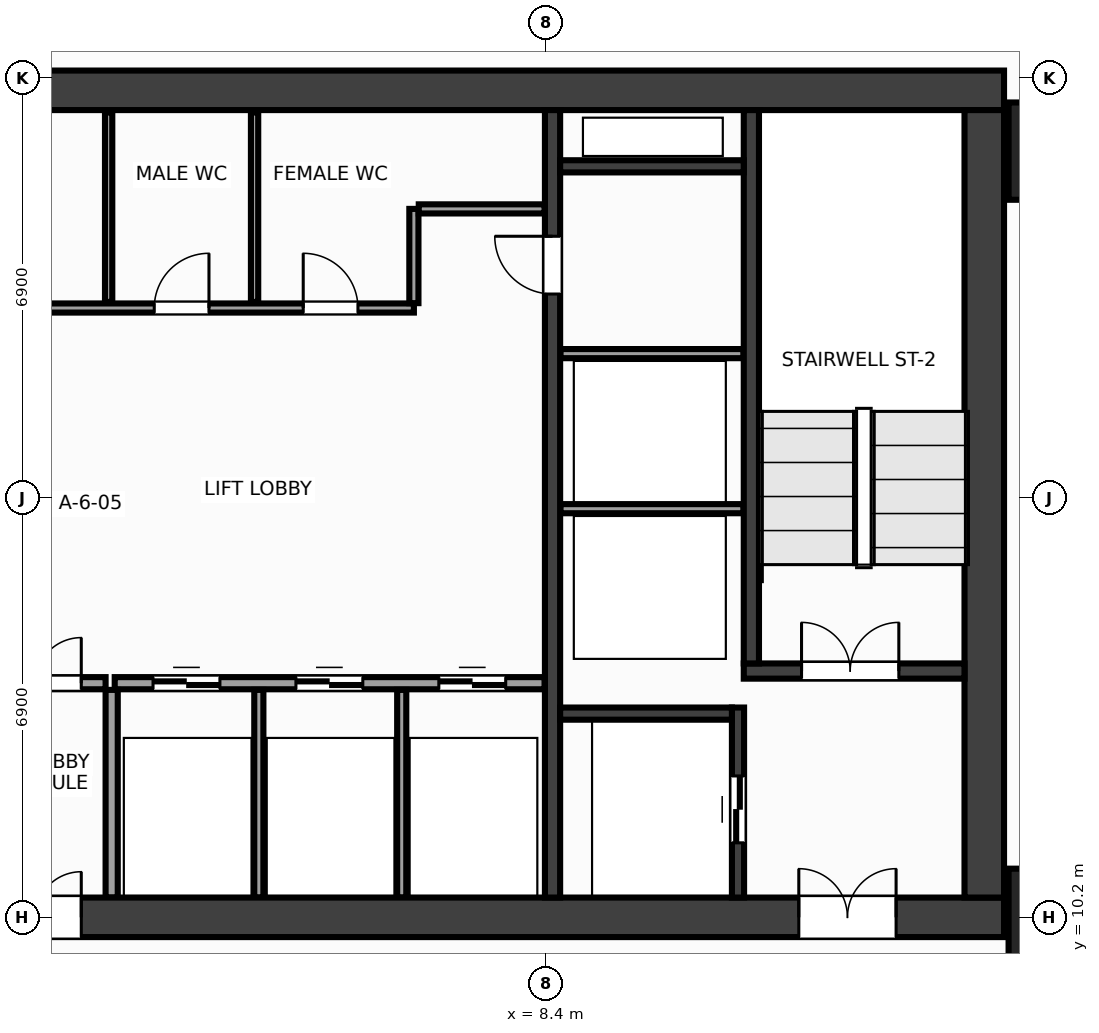
"""IFC4 building model, lengths in metres.
Left out: names, types, materials, properties, quantities, classifications, styles, units other than length and angle.
Written with IfcOpenShell. Run it as: python <this file> out.ifc"""

import sys

from ifc_helpers import new_model, si_unit, direction, frame, frame_2d, origin, origin_2d, place, context, subcontext, project, spatial, rectangle, extrude, source, transform, mapped, element, fill, save


model = new_model("IFC4")
c1 = context("Model", 3, precision=1e-05, world=origin(), true_north=direction((0.0, 1.0)))
c2 = subcontext(c1, "Body", "Model", "MODEL_VIEW")
j1 = project(units=[si_unit("LENGTHUNIT", "METRE"), si_unit("PLANEANGLEUNIT", "RADIAN")], contexts=[c1])
p1 = place(None, origin())
s1 = spatial("IfcSite", under=j1, at=p1, CompositionType="ELEMENT")
p2 = place(p1, origin())
s2 = spatial("IfcBuilding", under=s1, at=p2, CompositionType="ELEMENT")
p3 = place(p2, frame((0.0, 0.0, 171.2)))
s3 = spatial("IfcBuildingStorey", under=s2, at=p3, CompositionType="ELEMENT", Elevation=171.2)
m1 = source(origin(), c2, "Body", "SweptSolid", [
    extrude(rectangle(XDim=31.85, YDim=0.65, at=frame_2d((15.925, 0.0))), origin(), (0.0, 0.0, 1.0), 3.6),
])
p4 = place(p3, frame((-15.925, 23.8, 0.0), z_axis=(0.0, 0.0, 1.0), x_axis=(1.0, 0.0, 0.0)))
e1 = element("IfcWall", 1, at=p4, inside=s3, PredefinedType="SHEAR", context=c2, shape_type="MappedRepresentation", body=[
    mapped(m1, transform((0.0, 0.0, 0.0), x_axis=(1.0, 0.0, 0.0), y_axis=(0.0, 1.0, 0.0), z_axis=(0.0, 0.0, 1.0), scale=1.0)),
])
p5 = place(p3, frame((-15.925, 10.2, 0.0), z_axis=(0.0, 0.0, 1.0), x_axis=(1.0, 0.0, 0.0)))
e2 = element("IfcWall", 2, at=p5, inside=s3, PredefinedType="SHEAR", context=c2, shape_type="MappedRepresentation", body=[
    mapped(m1, transform((0.0, 0.0, 0.0), x_axis=(1.0, 0.0, 0.0), y_axis=(0.0, 1.0, 0.0), z_axis=(0.0, 0.0, 1.0), scale=1.0)),
])
p6 = place(p5, frame((1.775, 0.0, 0.0)))
e3 = element("IfcOpeningElement", 3, at=p6, cuts=e2, PredefinedType="OPENING", context=c2, shape_type="SweptSolid", body=[
    extrude(rectangle(XDim=1.6, YDim=2.15, at=frame_2d((0.8, 1.075))), frame((0.0, 0.337, 0.0), z_axis=(0.0, -1.0, 0.0), x_axis=(1.0, 0.0, 0.0)), (0.0, 0.0, 1.0), 0.674),
])
p7 = place(p5, frame((28.475, 0.0, 0.0)))
e4 = element("IfcOpeningElement", 4, at=p7, cuts=e2, PredefinedType="OPENING", context=c2, shape_type="SweptSolid", body=[
    extrude(rectangle(XDim=1.6, YDim=2.15, at=frame_2d((0.8, 1.075))), frame((0.0, 0.337, 0.0), z_axis=(0.0, -1.0, 0.0), x_axis=(1.0, 0.0, 0.0)), (0.0, 0.0, 1.0), 0.674),
])
p8 = place(p5, frame((15.175, 0.0, 0.0)))
e5 = element("IfcOpeningElement", 5, at=p8, cuts=e2, PredefinedType="OPENING", context=c2, shape_type="SweptSolid", body=[
    extrude(rectangle(XDim=1.5, YDim=2.2, at=frame_2d((0.75, 1.1))), frame((0.0, 0.337, 0.0), z_axis=(0.0, -1.0, 0.0), x_axis=(1.0, 0.0, 0.0)), (0.0, 0.0, 1.0), 0.674),
])
m2 = source(origin(), c2, "Body", "SweptSolid", [
    extrude(rectangle(XDim=12.95, YDim=0.65, at=frame_2d((6.475, 0.0))), origin(), (0.0, 0.0, 1.0), 3.6),
])
p9 = place(p3, frame((15.6, 10.525, 0.0), z_axis=(0.0, 0.0, 1.0), x_axis=(0.0, 1.0, 0.0)))
e6 = element("IfcWall", 6, at=p9, inside=s3, PredefinedType="SHEAR", context=c2, shape_type="MappedRepresentation", body=[
    mapped(m2, transform((0.0, 0.0, 0.0), x_axis=(1.0, 0.0, 0.0), y_axis=(0.0, 1.0, 0.0), z_axis=(0.0, 0.0, 1.0), scale=1.0)),
])
m3 = source(origin(), c2, "Body", "SweptSolid", [
    extrude(rectangle(XDim=12.95, YDim=0.25, at=frame_2d((6.475, 0.0))), origin(), (0.0, 0.0, 1.0), 3.6),
])
p10 = place(p3, frame((8.5, 10.525, 0.0), z_axis=(0.0, 0.0, 1.0), x_axis=(0.0, 1.0, 0.0)))
e7 = element("IfcWall", 7, at=p10, inside=s3, PredefinedType="SHEAR", context=c2, shape_type="MappedRepresentation", body=[
    mapped(m3, transform((0.0, 0.0, 0.0), x_axis=(1.0, 0.0, 0.0), y_axis=(0.0, 1.0, 0.0), z_axis=(0.0, 0.0, 1.0), scale=1.0)),
])
p11 = place(p10, frame((9.925, 0.0, 0.0)))
e8 = element("IfcOpeningElement", 8, at=p11, cuts=e7, PredefinedType="OPENING", context=c2, shape_type="SweptSolid", body=[
    extrude(rectangle(XDim=0.95, YDim=2.15, at=frame_2d((0.475, 1.075))), frame((0.0, 0.137, 0.0), z_axis=(0.0, -1.0, 0.0), x_axis=(1.0, 0.0, 0.0)), (0.0, 0.0, 1.0), 0.274),
])
m4 = source(origin(), c2, "Body", "SweptSolid", [
    extrude(rectangle(XDim=3.63, YDim=0.25, at=frame_2d((1.815, 0.0))), origin(), (0.0, 0.0, 1.0), 3.6),
])
p12 = place(p3, frame((11.645, 14.25, 0.0), z_axis=(0.0, 0.0, 1.0), x_axis=(1.0, 0.0, 0.0)))
e9 = element("IfcWall", 9, at=p12, inside=s3, PredefinedType="SHEAR", context=c2, shape_type="MappedRepresentation", body=[
    mapped(m4, transform((0.0, 0.0, 0.0), x_axis=(1.0, 0.0, 0.0), y_axis=(0.0, 1.0, 0.0), z_axis=(0.0, 0.0, 1.0), scale=1.0)),
])
p13 = place(p12, frame((0.95, 0.0, 0.0)))
e10 = element("IfcOpeningElement", 10, at=p13, cuts=e9, PredefinedType="OPENING", context=c2, shape_type="SweptSolid", body=[
    extrude(rectangle(XDim=1.6, YDim=2.15, at=frame_2d((0.8, 1.075))), frame((0.0, 0.137, 0.0), z_axis=(0.0, -1.0, 0.0), x_axis=(1.0, 0.0, 0.0)), (0.0, 0.0, 1.0), 0.274),
])
m5 = source(origin(), c2, "Body", "SweptSolid", [
    extrude(rectangle(XDim=9.1, YDim=0.25, at=frame_2d((4.55, 0.0))), origin(), (0.0, 0.0, 1.0), 3.6),
])
p14 = place(p3, frame((11.77, 14.375, 0.0), z_axis=(0.0, 0.0, 1.0), x_axis=(0.0, 1.0, 0.0)))
e11 = element("IfcWall", 11, at=p14, inside=s3, PredefinedType="SHEAR", context=c2, shape_type="MappedRepresentation", body=[
    mapped(m5, transform((0.0, 0.0, 0.0), x_axis=(1.0, 0.0, 0.0), y_axis=(0.0, 1.0, 0.0), z_axis=(0.0, 0.0, 1.0), scale=1.0)),
])
m6 = source(origin(), c2, "Body", "SweptSolid", [
    extrude(rectangle(XDim=3.125, YDim=0.2, at=frame_2d((1.562, 0.0))), origin(), (0.0, 0.0, 1.0), 3.6),
])
p15 = place(p3, frame((11.55, 10.525, 0.0), z_axis=(0.0, 0.0, 1.0), x_axis=(0.0, 1.0, 0.0)))
e12 = element("IfcWall", 12, at=p15, inside=s3, PredefinedType="SHEAR", context=c2, shape_type="MappedRepresentation", body=[
    mapped(m6, transform((0.0, 0.0, 0.0), x_axis=(1.0, 0.0, 0.0), y_axis=(0.0, 1.0, 0.0), z_axis=(0.0, 0.0, 1.0), scale=1.0)),
])
p16 = place(p15, frame((0.9, 0.0, 0.0)))
e13 = element("IfcOpeningElement", 13, at=p16, cuts=e12, PredefinedType="OPENING", context=c2, shape_type="SweptSolid", body=[
    extrude(rectangle(XDim=1.1, YDim=2.15, at=frame_2d((0.55, 1.075))), frame((0.0, 0.112, 0.0), z_axis=(0.0, -1.0, 0.0), x_axis=(1.0, 0.0, 0.0)), (0.0, 0.0, 1.0), 0.224),
])
m7 = source(origin(), c2, "Body", "SweptSolid", [
    extrude(rectangle(XDim=2.825, YDim=0.2, at=frame_2d((1.413, 0.0))), origin(), (0.0, 0.0, 1.0), 3.6),
])
p17 = place(p3, frame((8.625, 13.55, 0.0), z_axis=(0.0, 0.0, 1.0), x_axis=(1.0, 0.0, 0.0)))
e14 = element("IfcWall", 14, at=p17, inside=s3, PredefinedType="SHEAR", context=c2, shape_type="MappedRepresentation", body=[
    mapped(m7, transform((0.0, 0.0, 0.0), x_axis=(1.0, 0.0, 0.0), y_axis=(0.0, 1.0, 0.0), z_axis=(0.0, 0.0, 1.0), scale=1.0)),
])
m8 = source(origin(), c2, "Body", "SweptSolid", [
    extrude(rectangle(XDim=3.02, YDim=0.2, at=frame_2d((1.51, 0.0))), origin(), (0.0, 0.0, 1.0), 3.6),
])
p18 = place(p3, frame((8.625, 22.55, 0.0), z_axis=(0.0, 0.0, 1.0), x_axis=(1.0, 0.0, 0.0)))
e15 = element("IfcWall", 15, at=p18, inside=s3, PredefinedType="SHEAR", context=c2, shape_type="MappedRepresentation", body=[
    mapped(m8, transform((0.0, 0.0, 0.0), x_axis=(1.0, 0.0, 0.0), y_axis=(0.0, 1.0, 0.0), z_axis=(0.0, 0.0, 1.0), scale=1.0)),
])
m9 = source(origin(), c2, "Body", "SweptSolid", [
    extrude(rectangle(XDim=1.6, YDim=1.6, at=origin_2d()), origin(), (0.0, 0.0, 1.0), 3.6),
])
for number, where, z_axis, x_axis in (
    (16, (16.8, 10.2, 0.0), (0.0, 0.0, 1.0), (1.0, 0.0, 0.0)),
    (17, (16.8, 22.8, 0.0), (0.0, 0.0, 1.0), (1.0, 0.0, 0.0)),
):
    element("IfcColumn", number, at=place(p3, frame(where, z_axis=z_axis, x_axis=x_axis)), inside=s3, PredefinedType="COLUMN", context=c2, shape_type="MappedRepresentation", body=[
        mapped(m9, transform((0.0, 0.0, 0.0), x_axis=(1.0, 0.0, 0.0), y_axis=(0.0, 1.0, 0.0), z_axis=(0.0, 0.0, 1.0), scale=1.0)),
    ])
m10 = source(origin(), c2, "Body", "SweptSolid", [
    extrude(rectangle(XDim=3.01, YDim=0.15, at=frame_2d((1.505, 0.0))), origin(), (0.0, 0.0, 1.0), 3.38),
])
for number, where, z_axis, x_axis in (
    (18, (8.63, 16.92, 0.0), (0.0, 0.0, 1.0), (1.0, 0.0, 0.0)),
    (19, (8.63, 19.47, 0.0), (0.0, 0.0, 1.0), (1.0, 0.0, 0.0)),
):
    element("IfcWall", number, at=place(p3, frame(where, z_axis=z_axis, x_axis=x_axis)), inside=s3, PredefinedType="PARTITIONING", context=c2, shape_type="MappedRepresentation", body=[
        mapped(m10, transform((0.0, 0.0, 0.0), x_axis=(1.0, 0.0, 0.0), y_axis=(0.0, 1.0, 0.0), z_axis=(0.0, 0.0, 1.0), scale=1.0)),
    ])
m11 = source(origin(), c2, "Body", "SweptSolid", [
    extrude(rectangle(XDim=7.07, YDim=0.2, at=frame_2d((3.535, 0.0))), origin(), (0.0, 0.0, 1.0), 3.38),
])
p19 = place(p3, frame((1.3, 14.05, 0.0), z_axis=(0.0, 0.0, 1.0), x_axis=(1.0, 0.0, 0.0)))
e20 = element("IfcWall", 20, at=p19, inside=s3, PredefinedType="PARTITIONING", context=c2, shape_type="MappedRepresentation", body=[
    mapped(m11, transform((0.0, 0.0, 0.0), x_axis=(1.0, 0.0, 0.0), y_axis=(0.0, 1.0, 0.0), z_axis=(0.0, 0.0, 1.0), scale=1.0)),
])
p20 = place(p19, frame((0.63, 0.0, 0.0)))
e21 = element("IfcOpeningElement", 21, at=p20, cuts=e20, PredefinedType="OPENING", context=c2, shape_type="SweptSolid", body=[
    extrude(rectangle(XDim=1.1, YDim=2.15, at=frame_2d((0.55, 1.075))), frame((0.0, 0.112, 0.0), z_axis=(0.0, -1.0, 0.0), x_axis=(1.0, 0.0, 0.0)), (0.0, 0.0, 1.0), 0.224),
])
p21 = place(p19, frame((2.98, 0.0, 0.0)))
e22 = element("IfcOpeningElement", 22, at=p21, cuts=e20, PredefinedType="OPENING", context=c2, shape_type="SweptSolid", body=[
    extrude(rectangle(XDim=1.1, YDim=2.15, at=frame_2d((0.55, 1.075))), frame((0.0, 0.112, 0.0), z_axis=(0.0, -1.0, 0.0), x_axis=(1.0, 0.0, 0.0)), (0.0, 0.0, 1.0), 0.224),
])
p22 = place(p19, frame((5.33, 0.0, 0.0)))
e23 = element("IfcOpeningElement", 23, at=p22, cuts=e20, PredefinedType="OPENING", context=c2, shape_type="SweptSolid", body=[
    extrude(rectangle(XDim=1.1, YDim=2.15, at=frame_2d((0.55, 1.075))), frame((0.0, 0.112, 0.0), z_axis=(0.0, -1.0, 0.0), x_axis=(1.0, 0.0, 0.0)), (0.0, 0.0, 1.0), 0.224),
])
m12 = source(origin(), c2, "Body", "SweptSolid", [
    extrude(rectangle(XDim=3.415, YDim=0.2, at=frame_2d((1.708, 0.0))), origin(), (0.0, 0.0, 1.0), 3.38),
])
p23 = place(p3, frame((1.25, 10.525, 0.0), z_axis=(0.0, 0.0, 1.0), x_axis=(0.0, 1.0, 0.0)))
e24 = element("IfcWall", 24, at=p23, inside=s3, PredefinedType="PARTITIONING", context=c2, shape_type="MappedRepresentation", body=[
    mapped(m12, transform((0.0, 0.0, 0.0), x_axis=(1.0, 0.0, 0.0), y_axis=(0.0, 1.0, 0.0), z_axis=(0.0, 0.0, 1.0), scale=1.0)),
])
m13 = source(origin(), c2, "Body", "SweptSolid", [
    extrude(rectangle(XDim=2.3, YDim=0.2, at=frame_2d((1.15, 0.0))), origin(), (0.0, 0.0, 1.0), 3.38),
])
p24 = place(p3, frame((-1.15, 14.05, 0.0), z_axis=(0.0, 0.0, 1.0), x_axis=(1.0, 0.0, 0.0)))
e25 = element("IfcWall", 25, at=p24, inside=s3, PredefinedType="PARTITIONING", context=c2, shape_type="MappedRepresentation", body=[
    mapped(m13, transform((0.0, 0.0, 0.0), x_axis=(1.0, 0.0, 0.0), y_axis=(0.0, 1.0, 0.0), z_axis=(0.0, 0.0, 1.0), scale=1.0)),
])
p25 = place(p24, frame((0.4, 0.0, 0.0)))
e26 = element("IfcOpeningElement", 26, at=p25, cuts=e25, PredefinedType="OPENING", context=c2, shape_type="SweptSolid", body=[
    extrude(rectangle(XDim=1.5, YDim=2.2, at=frame_2d((0.75, 1.1))), frame((0.0, 0.112, 0.0), z_axis=(0.0, -1.0, 0.0), x_axis=(1.0, 0.0, 0.0)), (0.0, 0.0, 1.0), 0.224),
])
m14 = source(origin(), c2, "Body", "SweptSolid", [
    extrude(rectangle(XDim=14.59, YDim=0.15, at=frame_2d((7.295, 0.0))), origin(), (0.0, 0.0, 1.0), 3.38),
])
p26 = place(p3, frame((-8.37, 20.22, 0.0), z_axis=(0.0, 0.0, 1.0), x_axis=(1.0, 0.0, 0.0)))
e27 = element("IfcWall", 27, at=p26, inside=s3, PredefinedType="PARTITIONING", context=c2, shape_type="MappedRepresentation", body=[
    mapped(m14, transform((0.0, 0.0, 0.0), x_axis=(1.0, 0.0, 0.0), y_axis=(0.0, 1.0, 0.0), z_axis=(0.0, 0.0, 1.0), scale=1.0)),
])
p27 = place(p26, frame((4.36, 0.0, 0.0)))
e28 = element("IfcOpeningElement", 28, at=p27, cuts=e27, PredefinedType="OPENING", context=c2, shape_type="SweptSolid", body=[
    extrude(rectangle(XDim=0.9, YDim=2.15, at=frame_2d((0.45, 1.075))), frame((0.0, 0.087, 0.0), z_axis=(0.0, -1.0, 0.0), x_axis=(1.0, 0.0, 0.0)), (0.0, 0.0, 1.0), 0.174),
])
p28 = place(p26, frame((10.32, 0.0, 0.0)))
e29 = element("IfcOpeningElement", 29, at=p28, cuts=e27, PredefinedType="OPENING", context=c2, shape_type="SweptSolid", body=[
    extrude(rectangle(XDim=0.9, YDim=2.15, at=frame_2d((0.45, 1.075))), frame((0.0, 0.087, 0.0), z_axis=(0.0, -1.0, 0.0), x_axis=(1.0, 0.0, 0.0)), (0.0, 0.0, 1.0), 0.174),
])
p29 = place(p26, frame((12.77, 0.0, 0.0)))
e30 = element("IfcOpeningElement", 30, at=p29, cuts=e27, PredefinedType="OPENING", context=c2, shape_type="SweptSolid", body=[
    extrude(rectangle(XDim=0.9, YDim=2.15, at=frame_2d((0.45, 1.075))), frame((0.0, 0.087, 0.0), z_axis=(0.0, -1.0, 0.0), x_axis=(1.0, 0.0, 0.0)), (0.0, 0.0, 1.0), 0.174),
])
m15 = source(origin(), c2, "Body", "SweptSolid", [
    extrude(rectangle(XDim=1.55, YDim=0.15, at=frame_2d((0.775, 0.0))), origin(), (0.0, 0.0, 1.0), 3.38),
])
p30 = place(p3, frame((6.22, 20.3, 0.0), z_axis=(0.0, 0.0, 1.0), x_axis=(0.0, 1.0, 0.0)))
e31 = element("IfcWall", 31, at=p30, inside=s3, PredefinedType="PARTITIONING", context=c2, shape_type="MappedRepresentation", body=[
    mapped(m15, transform((0.0, 0.0, 0.0), x_axis=(1.0, 0.0, 0.0), y_axis=(0.0, 1.0, 0.0), z_axis=(0.0, 0.0, 1.0), scale=1.0)),
])
m16 = source(origin(), c2, "Body", "SweptSolid", [
    extrude(rectangle(XDim=2.07, YDim=0.15, at=frame_2d((1.035, 0.0))), origin(), (0.0, 0.0, 1.0), 3.38),
])
p31 = place(p3, frame((6.3, 21.85, 0.0), z_axis=(0.0, 0.0, 1.0), x_axis=(1.0, 0.0, 0.0)))
e32 = element("IfcWall", 32, at=p31, inside=s3, PredefinedType="PARTITIONING", context=c2, shape_type="MappedRepresentation", body=[
    mapped(m16, transform((0.0, 0.0, 0.0), x_axis=(1.0, 0.0, 0.0), y_axis=(0.0, 1.0, 0.0), z_axis=(0.0, 0.0, 1.0), scale=1.0)),
])
m17 = source(origin(), c2, "Body", "SweptSolid", [
    extrude(rectangle(XDim=3.415, YDim=0.15, at=frame_2d((1.708, 0.0))), origin(), (0.0, 0.0, 1.0), 3.38),
])
for number, where, z_axis, x_axis in (
    (33, (3.67, 10.525, 0.0), (0.0, 0.0, 1.0), (0.0, 1.0, 0.0)),
    (34, (6.02, 10.525, 0.0), (0.0, 0.0, 1.0), (0.0, 1.0, 0.0)),
):
    element("IfcWall", number, at=place(p3, frame(where, z_axis=z_axis, x_axis=x_axis)), inside=s3, PredefinedType="PARTITIONING", context=c2, shape_type="MappedRepresentation", body=[
        mapped(m17, transform((0.0, 0.0, 0.0), x_axis=(1.0, 0.0, 0.0), y_axis=(0.0, 1.0, 0.0), z_axis=(0.0, 0.0, 1.0), scale=1.0)),
    ])
m18 = source(origin(), c2, "Body", "SweptSolid", [
    extrude(rectangle(XDim=3.115, YDim=0.12, at=frame_2d((1.558, 0.0))), origin(), (0.0, 0.0, 1.0), 3.38),
])
for number, where, z_axis, x_axis in (
    (35, (1.2, 20.32, 0.0), (0.0, 0.0, 1.0), (0.0, 1.0, 0.0)),
    (36, (3.6, 20.32, 0.0), (0.0, 0.0, 1.0), (0.0, 1.0, 0.0)),
):
    element("IfcWall", number, at=place(p3, frame(where, z_axis=z_axis, x_axis=x_axis)), inside=s3, PredefinedType="PARTITIONING", context=c2, shape_type="MappedRepresentation", body=[
        mapped(m18, transform((0.0, 0.0, 0.0), x_axis=(1.0, 0.0, 0.0), y_axis=(0.0, 1.0, 0.0), z_axis=(0.0, 0.0, 1.0), scale=1.0)),
    ])
m19 = source(origin(), c2, "Body", "SweptSolid", [
    extrude(rectangle(XDim=1.6, YDim=2.15, at=frame_2d((0.8, 1.075))), frame((0.0, 0.025, 0.0), z_axis=(0.0, -1.0, 0.0), x_axis=(1.0, 0.0, 0.0)), (0.0, 0.0, 1.0), 0.05),
])
p32 = place(p13, origin())
e37 = element("IfcDoor", 37, at=p32, inside=s3, OperationType="DOUBLE_DOOR_SINGLE_SWING", PredefinedType="DOOR", context=c2, shape_type="MappedRepresentation", body=[
    mapped(m19, transform((0.0, 0.0, 0.0), x_axis=(1.0, 0.0, 0.0), y_axis=(0.0, 1.0, 0.0), z_axis=(0.0, 0.0, 1.0), scale=1.0)),
])
fill(e10, e37)
p33 = place(p7, origin())
e38 = element("IfcDoor", 38, at=p33, inside=s3, OperationType="DOUBLE_DOOR_SINGLE_SWING", PredefinedType="DOOR", context=c2, shape_type="MappedRepresentation", body=[
    mapped(m19, transform((0.0, 0.0, 0.0), x_axis=(1.0, 0.0, 0.0), y_axis=(0.0, 1.0, 0.0), z_axis=(0.0, 0.0, 1.0), scale=1.0)),
])
fill(e4, e38)
m20 = source(origin(), c2, "Body", "SweptSolid", [
    extrude(rectangle(XDim=1.1, YDim=2.15, at=frame_2d((0.55, 1.075))), frame((0.0, 0.025, 0.0), z_axis=(0.0, -1.0, 0.0), x_axis=(1.0, 0.0, 0.0)), (0.0, 0.0, 1.0), 0.05),
])
p34 = place(p16, origin())
e39 = element("IfcDoor", 39, at=p34, inside=s3, OperationType="DOUBLE_DOOR_SLIDING", PredefinedType="DOOR", context=c2, shape_type="MappedRepresentation", body=[
    mapped(m20, transform((0.0, 0.0, 0.0), x_axis=(1.0, 0.0, 0.0), y_axis=(0.0, 1.0, 0.0), z_axis=(0.0, 0.0, 1.0), scale=1.0)),
])
fill(e13, e39)
m21 = source(origin(), c2, "Body", "SweptSolid", [
    extrude(rectangle(XDim=0.95, YDim=2.15, at=frame_2d((0.475, 1.075))), frame((0.0, 0.025, 0.0), z_axis=(0.0, -1.0, 0.0), x_axis=(1.0, 0.0, 0.0)), (0.0, 0.0, 1.0), 0.05),
])
p35 = place(p11, origin())
e40 = element("IfcDoor", 40, at=p35, inside=s3, OperationType="SINGLE_SWING_RIGHT", PredefinedType="DOOR", context=c2, shape_type="MappedRepresentation", body=[
    mapped(m21, transform((0.0, 0.0, 0.0), x_axis=(1.0, 0.0, 0.0), y_axis=(0.0, 1.0, 0.0), z_axis=(0.0, 0.0, 1.0), scale=1.0)),
])
fill(e8, e40)
p36 = place(p20, origin())
e41 = element("IfcDoor", 41, at=p36, inside=s3, OperationType="DOUBLE_DOOR_SLIDING", PredefinedType="DOOR", context=c2, shape_type="MappedRepresentation", body=[
    mapped(m20, transform((0.0, 0.0, 0.0), x_axis=(1.0, 0.0, 0.0), y_axis=(0.0, 1.0, 0.0), z_axis=(0.0, 0.0, 1.0), scale=1.0)),
])
fill(e21, e41)
p37 = place(p21, origin())
e42 = element("IfcDoor", 42, at=p37, inside=s3, OperationType="DOUBLE_DOOR_SLIDING", PredefinedType="DOOR", context=c2, shape_type="MappedRepresentation", body=[
    mapped(m20, transform((0.0, 0.0, 0.0), x_axis=(1.0, 0.0, 0.0), y_axis=(0.0, 1.0, 0.0), z_axis=(0.0, 0.0, 1.0), scale=1.0)),
])
fill(e22, e42)
p38 = place(p22, origin())
e43 = element("IfcDoor", 43, at=p38, inside=s3, OperationType="DOUBLE_DOOR_SLIDING", PredefinedType="DOOR", context=c2, shape_type="MappedRepresentation", body=[
    mapped(m20, transform((0.0, 0.0, 0.0), x_axis=(1.0, 0.0, 0.0), y_axis=(0.0, 1.0, 0.0), z_axis=(0.0, 0.0, 1.0), scale=1.0)),
])
fill(e23, e43)
m22 = source(origin(), c2, "Body", "SweptSolid", [
    extrude(rectangle(XDim=1.5, YDim=2.2, at=frame_2d((0.75, 1.1))), frame((0.0, 0.025, 0.0), z_axis=(0.0, -1.0, 0.0), x_axis=(1.0, 0.0, 0.0)), (0.0, 0.0, 1.0), 0.05),
])
p39 = place(p25, origin())
e44 = element("IfcDoor", 44, at=p39, inside=s3, OperationType="DOUBLE_DOOR_SINGLE_SWING", PredefinedType="DOOR", context=c2, shape_type="MappedRepresentation", body=[
    mapped(m22, transform((0.0, 0.0, 0.0), x_axis=(1.0, 0.0, 0.0), y_axis=(0.0, 1.0, 0.0), z_axis=(0.0, 0.0, 1.0), scale=1.0)),
])
fill(e26, e44)
p40 = place(p8, origin())
e45 = element("IfcDoor", 45, at=p40, inside=s3, OperationType="DOUBLE_DOOR_SINGLE_SWING", PredefinedType="DOOR", context=c2, shape_type="MappedRepresentation", body=[
    mapped(m22, transform((0.0, 0.0, 0.0), x_axis=(1.0, 0.0, 0.0), y_axis=(0.0, 1.0, 0.0), z_axis=(0.0, 0.0, 1.0), scale=1.0)),
])
fill(e5, e45)
m23 = source(origin(), c2, "Body", "SweptSolid", [
    extrude(rectangle(XDim=0.9, YDim=2.15, at=frame_2d((0.45, 1.075))), frame((0.0, 0.025, 0.0), z_axis=(0.0, -1.0, 0.0), x_axis=(1.0, 0.0, 0.0)), (0.0, 0.0, 1.0), 0.05),
])
p41 = place(p28, origin())
e46 = element("IfcDoor", 46, at=p41, inside=s3, OperationType="SINGLE_SWING_RIGHT", PredefinedType="DOOR", context=c2, shape_type="MappedRepresentation", body=[
    mapped(m23, transform((0.0, 0.0, 0.0), x_axis=(1.0, 0.0, 0.0), y_axis=(0.0, 1.0, 0.0), z_axis=(0.0, 0.0, 1.0), scale=1.0)),
])
fill(e29, e46)
p42 = place(p29, origin())
e47 = element("IfcDoor", 47, at=p42, inside=s3, OperationType="SINGLE_SWING_LEFT", PredefinedType="DOOR", context=c2, shape_type="MappedRepresentation", body=[
    mapped(m23, transform((0.0, 0.0, 0.0), x_axis=(1.0, 0.0, 0.0), y_axis=(0.0, 1.0, 0.0), z_axis=(0.0, 0.0, 1.0), scale=1.0)),
])
fill(e30, e47)
save(model, sys.argv[1])
